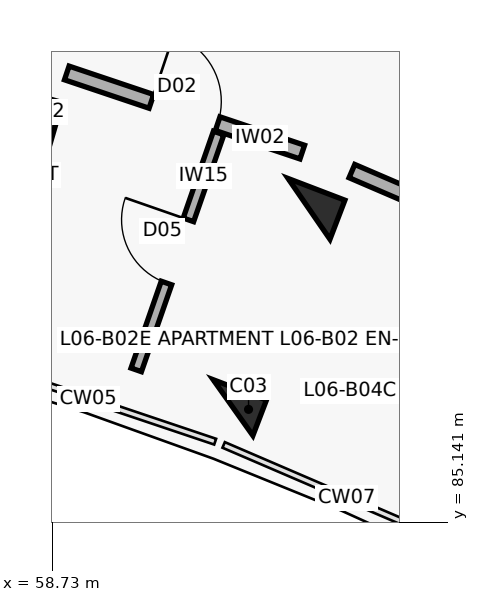
"""IFC4 building model, lengths in metres.
Left out: names, types, materials, properties, quantities, classifications, styles, units other than length and angle.
Written with IfcOpenShell. Run it as: python <this file> out.ifc"""

import sys

from ifc_helpers import new_model, si_unit, direction, frame, frame_2d, origin, origin_2d, place, context, subcontext, project, spatial, rectangle, extrude, element, fill, save


model = new_model("IFC4")
c1 = context("Model", 3, precision=1e-05, world=origin(), true_north=direction((0.0, 1.0)))
c2 = subcontext(c1, "Body", "Model", "MODEL_VIEW")
j1 = project(units=[si_unit("LENGTHUNIT", "METRE"), si_unit("PLANEANGLEUNIT", "RADIAN")], contexts=[c1])
p1 = place(None, origin())
s1 = spatial("IfcSite", under=j1, at=p1, CompositionType="ELEMENT")
p2 = place(p1, origin())
s2 = spatial("IfcBuilding", under=s1, at=p2, CompositionType="ELEMENT")
p3 = place(p2, frame((0.0, 0.0, 20.5)))
s3 = spatial("IfcBuildingStorey", under=s2, at=p3, CompositionType="ELEMENT", Elevation=20.5)
p4 = place(p3, frame((58.401, 90.508, 0.0), z_axis=(0.0, 0.0, 1.0), x_axis=(0.27966144946, 0.96009867914, 0.0)))
e1 = element("IfcColumn", 1, at=p4, inside=s3, PredefinedType="COLUMN", context=c2, shape_type="SweptSolid", body=[
    extrude(rectangle(XDim=0.55, YDim=0.8, at=origin_2d()), origin(), (0.0, 0.0, 1.0), 3.1),
])
p5 = place(p3, frame((61.111, 86.646, 0.0), z_axis=(0.0, 0.0, 1.0), x_axis=(0.357064076459, 0.934079892355, 0.0)))
e2 = element("IfcColumn", 2, at=p5, inside=s3, PredefinedType="COLUMN", context=c2, shape_type="SweptSolid", body=[
    extrude(rectangle(XDim=0.5, YDim=0.75, at=origin_2d()), origin(), (0.0, 0.0, 1.0), 3.1),
])
p6 = place(p3, frame((62.111, 89.261, 0.0), z_axis=(0.0, 0.0, 1.0), x_axis=(0.357064076459, 0.934079892355, 0.0)))
e3 = element("IfcColumn", 3, at=p6, inside=s3, PredefinedType="COLUMN", context=c2, shape_type="SweptSolid", body=[
    extrude(rectangle(XDim=0.55, YDim=0.8, at=origin_2d()), origin(), (0.0, 0.0, 1.0), 3.1),
])
p7 = place(p3, frame((58.923, 91.049, 0.0), z_axis=(0.0, 0.0, 1.0), x_axis=(0.94787351033, -0.318646839643, 0.0)))
e4 = element("IfcWall", 4, at=p7, inside=s3, PredefinedType="SOLIDWALL", context=c2, shape_type="SweptSolid", body=[
    extrude(rectangle(XDim=3.269, YDim=0.19, at=frame_2d((1.634, 0.0))), origin(), (0.0, 0.0, 1.0), 2.08),
])
p8 = place(p7, frame((1.174, 0.0, 0.0)))
e5 = element("IfcOpeningElement", 5, at=p8, cuts=e4, PredefinedType="OPENING", context=c2, shape_type="SweptSolid", body=[
    extrude(rectangle(XDim=0.92, YDim=2.1, at=frame_2d((0.46, 1.05))), frame((0.0, 0.105, 0.0), z_axis=(0.0, -1.0, 0.0), x_axis=(1.0, 0.0, 0.0)), (0.0, 0.0, 1.0), 0.21),
])
p9 = place(p3, frame((59.837, 87.143, 0.0), z_axis=(0.0, 0.0, 1.0), x_axis=(0.328629662527, 0.944458863534, 0.0)))
e6 = element("IfcWall", 6, at=p9, inside=s3, PredefinedType="PARTITIONING", context=c2, shape_type="SweptSolid", body=[
    extrude(rectangle(XDim=3.3, YDim=0.145, at=frame_2d((1.65, 0.0))), origin(), (0.0, 0.0, 1.0), 2.08),
])
p10 = place(p9, frame((1.21, 0.0, 0.0)))
e7 = element("IfcOpeningElement", 7, at=p10, cuts=e6, PredefinedType="OPENING", context=c2, shape_type="SweptSolid", body=[
    extrude(rectangle(XDim=0.88, YDim=2.1, at=frame_2d((0.44, 1.05))), frame((0.0, 0.083, 0.0), z_axis=(0.0, -1.0, 0.0), x_axis=(1.0, 0.0, 0.0)), (0.0, 0.0, 1.0), 0.165),
])
p11 = place(p3, frame((62.675, 89.758, 0.0), z_axis=(0.0, 0.0, 1.0), x_axis=(0.918723391052, -0.394901672235, 0.0)))
e8 = element("IfcWall", 8, at=p11, inside=s3, PredefinedType="SOLIDWALL", context=c2, shape_type="SweptSolid", body=[
    extrude(rectangle(XDim=3.269, YDim=0.19, at=frame_2d((1.634, 0.0))), origin(), (0.0, 0.0, 1.0), 2.08),
])
p12 = place(p11, frame((1.164, 0.0, 0.0)))
e9 = element("IfcOpeningElement", 9, at=p12, cuts=e8, PredefinedType="OPENING", context=c2, shape_type="SweptSolid", body=[
    extrude(rectangle(XDim=0.94, YDim=2.1, at=frame_2d((0.47, 1.05))), frame((0.0, 0.105, 0.0), z_axis=(0.0, -1.0, 0.0), x_axis=(1.0, 0.0, 0.0)), (0.0, 0.0, 1.0), 0.21),
])
p13 = place(p8, origin())
e10 = element("IfcDoor", 10, at=p13, inside=s3, OperationType="SINGLE_SWING_LEFT", PredefinedType="DOOR", context=c2, shape_type="SweptSolid", body=[
    extrude(rectangle(XDim=0.92, YDim=2.1, at=frame_2d((0.46, 1.05))), frame((0.0, 0.025, 0.0), z_axis=(0.0, -1.0, 0.0), x_axis=(1.0, 0.0, 0.0)), (0.0, 0.0, 1.0), 0.05),
])
fill(e5, e10)
p14 = place(p10, origin())
e11 = element("IfcDoor", 11, at=p14, inside=s3, OperationType="SINGLE_SWING_RIGHT", PredefinedType="DOOR", context=c2, shape_type="SweptSolid", body=[
    extrude(rectangle(XDim=0.88, YDim=2.1, at=frame_2d((0.44, 1.05))), frame((0.0, 0.025, 0.0), z_axis=(0.0, -1.0, 0.0), x_axis=(1.0, 0.0, 0.0)), (0.0, 0.0, 1.0), 0.05),
])
fill(e7, e11)
save(model, sys.argv[1])
